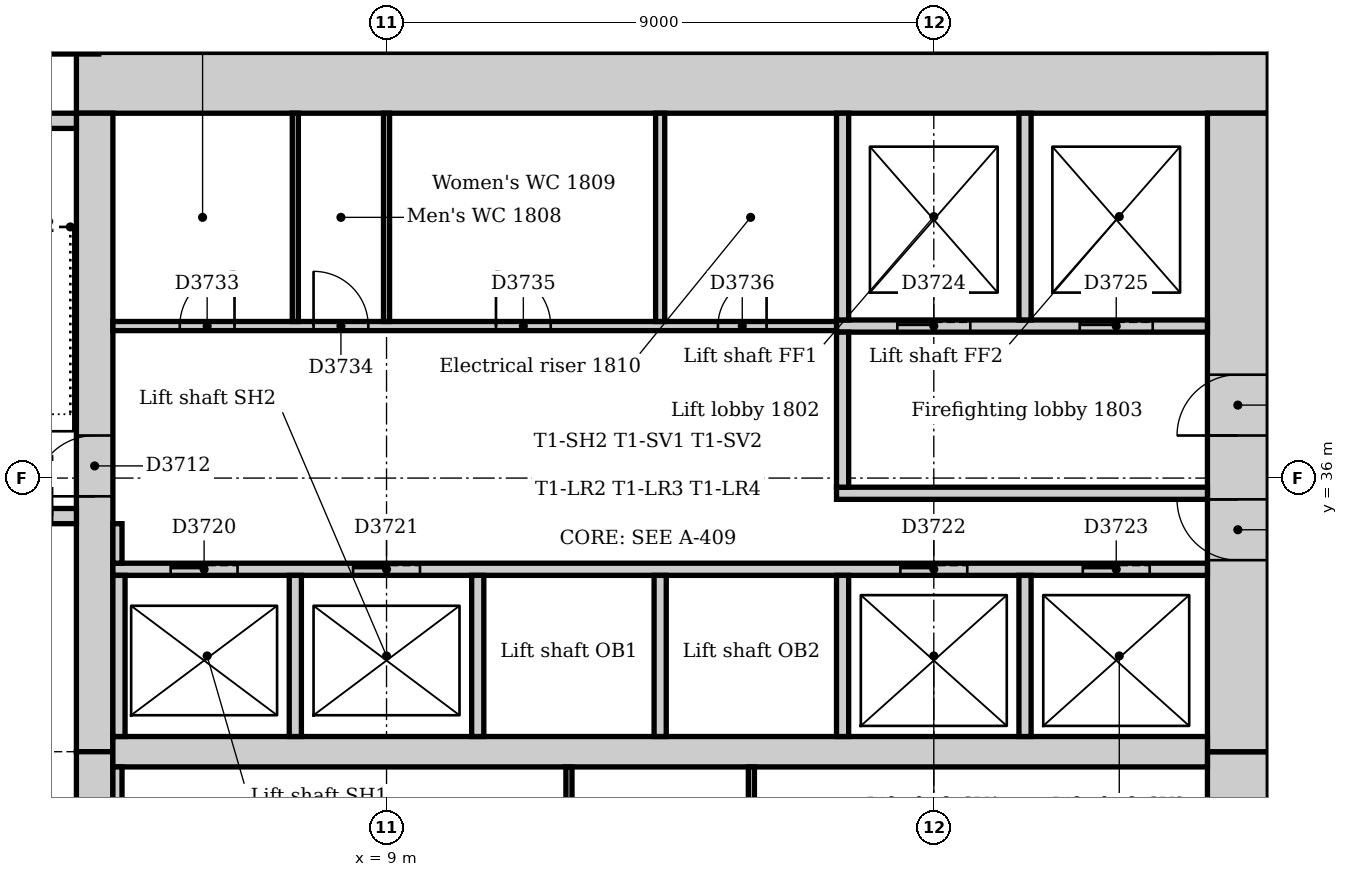
"""IFC4 building model, lengths in metres.
Left out: names, types, materials, properties, quantities, classifications, styles, units other than length and angle.
Written with IfcOpenShell. Run it as: python <this file> out.ifc"""

import sys

from ifc_helpers import new_model, si_unit, direction, frame, frame_2d, origin, origin_2d, place, context, subcontext, project, spatial, rectangle, extrude, element, fill, save


model = new_model("IFC4")
c1 = context("Model", 3, precision=1e-05, world=origin(), true_north=direction((0.0, 1.0)))
c2 = subcontext(c1, "Body", "Model", "MODEL_VIEW")
j1 = project(units=[si_unit("LENGTHUNIT", "METRE"), si_unit("PLANEANGLEUNIT", "RADIAN")], contexts=[c1])
p1 = place(None, origin())
s1 = spatial("IfcSite", under=j1, at=p1, CompositionType="ELEMENT")
p2 = place(p1, origin())
s2 = spatial("IfcBuilding", under=s1, at=p2, CompositionType="ELEMENT")
p3 = place(p2, frame((0.0, 0.0, 79.0)))
s3 = spatial("IfcBuildingStorey", under=s2, at=p3, CompositionType="ELEMENT", Elevation=79.0)
p4 = place(p3, frame((23.5, 42.5, 0.0), z_axis=(0.0, 0.0, 1.0), x_axis=(-1.0, 0.0, 0.0)))
e1 = element("IfcWall", 1, at=p4, inside=s3, PredefinedType="SOLIDWALL", context=c2, shape_type="SweptSolid", body=[
    extrude(rectangle(XDim=19.6, YDim=1.0, at=frame_2d((9.8, 0.0))), origin(), (0.0, 0.0, 1.0), 4.0),
])
p5 = place(p3, frame((23.0, 21.0, 0.0), z_axis=(0.0, 0.0, 1.0), x_axis=(0.0, 1.0, 0.0)))
e2 = element("IfcWall", 2, at=p5, inside=s3, PredefinedType="SOLIDWALL", context=c2, shape_type="SweptSolid", body=[
    extrude(rectangle(XDim=10.5, YDim=1.0, at=frame_2d((5.25, 0.0))), origin(), (0.0, 0.0, 1.0), 4.0),
])
p6 = place(p5, frame((4.35, 0.0, 0.0)))
e3 = element("IfcOpeningElement", 3, at=p6, cuts=e2, PredefinedType="OPENING", context=c2, shape_type="SweptSolid", body=[
    extrude(rectangle(XDim=1.8, YDim=2.1, at=frame_2d((0.9, 1.05))), frame((0.0, 0.51, 0.0), z_axis=(0.0, -1.0, 0.0), x_axis=(1.0, 0.0, 0.0)), (0.0, 0.0, 1.0), 1.02),
])
p7 = place(p3, frame((23.0, 31.5, 0.0), z_axis=(0.0, 0.0, 1.0), x_axis=(0.0, 1.0, 0.0)))
e4 = element("IfcWall", 4, at=p7, inside=s3, PredefinedType="SOLIDWALL", context=c2, shape_type="SweptSolid", body=[
    extrude(rectangle(XDim=10.5, YDim=1.0, at=frame_2d((5.25, 0.0))), origin(), (0.0, 0.0, 1.0), 4.0),
])
p8 = place(p7, frame((3.15, 0.0, 0.0)))
e5 = element("IfcOpeningElement", 5, at=p8, cuts=e4, PredefinedType="OPENING", context=c2, shape_type="SweptSolid", body=[
    extrude(rectangle(XDim=1.0, YDim=2.1, at=frame_2d((0.5, 1.05))), frame((0.0, 0.51, 0.0), z_axis=(0.0, -1.0, 0.0), x_axis=(1.0, 0.0, 0.0)), (0.0, 0.0, 1.0), 1.02),
])
p9 = place(p7, frame((5.2, 0.0, 0.0)))
e6 = element("IfcOpeningElement", 6, at=p9, cuts=e4, PredefinedType="OPENING", context=c2, shape_type="SweptSolid", body=[
    extrude(rectangle(XDim=1.0, YDim=2.1, at=frame_2d((0.5, 1.05))), frame((0.0, 0.51, 0.0), z_axis=(0.0, -1.0, 0.0), x_axis=(1.0, 0.0, 0.0)), (0.0, 0.0, 1.0), 1.02),
])
p10 = place(p3, frame((4.2, 42.0, 0.0), z_axis=(0.0, 0.0, 1.0), x_axis=(0.0, -1.0, 0.0)))
e7 = element("IfcWall", 7, at=p10, inside=s3, PredefinedType="SOLIDWALL", context=c2, shape_type="SweptSolid", body=[
    extrude(rectangle(XDim=10.5, YDim=0.6, at=frame_2d((5.25, 0.0))), origin(), (0.0, 0.0, 1.0), 4.0),
])
p11 = place(p10, frame((5.3, 0.0, 0.0)))
e8 = element("IfcOpeningElement", 8, at=p11, cuts=e7, PredefinedType="OPENING", context=c2, shape_type="SweptSolid", body=[
    extrude(rectangle(XDim=1.0, YDim=2.1, at=frame_2d((0.5, 1.05))), frame((0.0, 0.31, 0.0), z_axis=(0.0, -1.0, 0.0), x_axis=(1.0, 0.0, 0.0)), (0.0, 0.0, 1.0), 0.62),
])
p12 = place(p3, frame((4.2, 31.5, 0.0), z_axis=(0.0, 0.0, 1.0), x_axis=(0.0, -1.0, 0.0)))
e9 = element("IfcWall", 9, at=p12, inside=s3, PredefinedType="SOLIDWALL", context=c2, shape_type="SweptSolid", body=[
    extrude(rectangle(XDim=10.5, YDim=0.6, at=frame_2d((5.25, 0.0))), origin(), (0.0, 0.0, 1.0), 4.0),
])
p13 = place(p12, frame((4.25, 0.0, 0.0)))
e10 = element("IfcOpeningElement", 10, at=p13, cuts=e9, PredefinedType="OPENING", context=c2, shape_type="SweptSolid", body=[
    extrude(rectangle(XDim=1.0, YDim=2.1, at=frame_2d((0.5, 1.05))), frame((0.0, 0.31, 0.0), z_axis=(0.0, -1.0, 0.0), x_axis=(1.0, 0.0, 0.0)), (0.0, 0.0, 1.0), 0.62),
])
p14 = place(p3, frame((4.5, 31.5, 0.0), z_axis=(0.0, 0.0, 1.0), x_axis=(1.0, 0.0, 0.0)))
e11 = element("IfcWall", 11, at=p14, inside=s3, PredefinedType="SOLIDWALL", context=c2, shape_type="SweptSolid", body=[
    extrude(rectangle(XDim=18.0, YDim=0.5, at=frame_2d((9.0, 0.0))), origin(), (0.0, 0.0, 1.0), 4.0),
])
p15 = place(p3, frame((0.36, 35.375, 0.0), z_axis=(0.0, 0.0, 1.0), x_axis=(1.0, 0.0, 0.0)))
e12 = element("IfcWall", 12, at=p15, inside=s3, PredefinedType="SOLIDWALL", context=c2, shape_type="SweptSolid", body=[
    extrude(rectangle(XDim=3.54, YDim=0.25, at=frame_2d((1.77, 0.0))), origin(), (0.0, 0.0, 1.0), 4.0),
])
p16 = place(p15, frame((2.14, 0.0, 0.0)))
e13 = element("IfcOpeningElement", 13, at=p16, cuts=e12, PredefinedType="OPENING", context=c2, shape_type="SweptSolid", body=[
    extrude(rectangle(XDim=1.0, YDim=2.1, at=frame_2d((0.5, 1.05))), frame((0.0, 0.135, 0.0), z_axis=(0.0, -1.0, 0.0), x_axis=(1.0, 0.0, 0.0)), (0.0, 0.0, 1.0), 0.27),
])
p17 = place(p3, frame((3.9, 41.875, 0.0), z_axis=(0.0, 0.0, 1.0), x_axis=(-1.0, 0.0, 0.0)))
e14 = element("IfcWall", 14, at=p17, inside=s3, PredefinedType="SOLIDWALL", context=c2, shape_type="SweptSolid", body=[
    extrude(rectangle(XDim=3.54, YDim=0.25, at=frame_2d((1.77, 0.0))), origin(), (0.0, 0.0, 1.0), 4.0),
])
p18 = place(p3, frame((3.667, 43.574, 0.0), z_axis=(0.0, 0.0, 1.0), x_axis=(1.0, 0.0, 0.0)))
e15 = element("IfcColumn", 15, at=p18, inside=s3, PredefinedType="COLUMN", context=c2, shape_type="SweptSolid", body=[
    extrude(rectangle(XDim=1.2, YDim=1.2, at=origin_2d()), origin(), (0.0, 0.0, 1.0), 3.85),
])
p19 = place(p3, frame((16.4, 35.75, 0.0), z_axis=(0.0, 0.0, 1.0), x_axis=(1.0, 0.0, 0.0)))
e16 = element("IfcWall", 16, at=p19, inside=s3, PredefinedType="PARTITIONING", context=c2, shape_type="SweptSolid", body=[
    extrude(rectangle(XDim=6.1, YDim=0.2, at=frame_2d((3.05, 0.0))), origin(), (0.0, 0.0, 1.0), 3.85),
])
p20 = place(p3, frame((16.4, 38.5, 0.0), z_axis=(0.0, 0.0, 1.0), x_axis=(1.0, 0.0, 0.0)))
e17 = element("IfcWall", 17, at=p20, inside=s3, PredefinedType="PARTITIONING", context=c2, shape_type="SweptSolid", body=[
    extrude(rectangle(XDim=6.1, YDim=0.2, at=frame_2d((3.05, 0.0))), origin(), (0.0, 0.0, 1.0), 3.85),
])
p21 = place(p20, frame((1.0, 0.0, 0.0)))
e18 = element("IfcOpeningElement", 18, at=p21, cuts=e17, PredefinedType="OPENING", context=c2, shape_type="SweptSolid", body=[
    extrude(rectangle(XDim=1.2, YDim=2.1, at=frame_2d((0.6, 1.05))), frame((0.0, 0.11, 0.0), z_axis=(0.0, -1.0, 0.0), x_axis=(1.0, 0.0, 0.0)), (0.0, 0.0, 1.0), 0.22),
])
p22 = place(p20, frame((4.0, 0.0, 0.0)))
e19 = element("IfcOpeningElement", 19, at=p22, cuts=e17, PredefinedType="OPENING", context=c2, shape_type="SweptSolid", body=[
    extrude(rectangle(XDim=1.2, YDim=2.1, at=frame_2d((0.6, 1.05))), frame((0.0, 0.11, 0.0), z_axis=(0.0, -1.0, 0.0), x_axis=(1.0, 0.0, 0.0)), (0.0, 0.0, 1.0), 0.22),
])
p23 = place(p3, frame((16.5, 35.85, 0.0), z_axis=(0.0, 0.0, 1.0), x_axis=(0.0, 1.0, 0.0)))
e20 = element("IfcWall", 20, at=p23, inside=s3, PredefinedType="PARTITIONING", context=c2, shape_type="SweptSolid", body=[
    extrude(rectangle(XDim=2.55, YDim=0.2, at=frame_2d((1.275, 0.0))), origin(), (0.0, 0.0, 1.0), 3.85),
])
p24 = place(p3, frame((4.5, 34.5, 0.0), z_axis=(0.0, 0.0, 1.0), x_axis=(1.0, 0.0, 0.0)))
e21 = element("IfcWall", 21, at=p24, inside=s3, PredefinedType="PARTITIONING", context=c2, shape_type="SweptSolid", body=[
    extrude(rectangle(XDim=18.0, YDim=0.2, at=frame_2d((9.0, 0.0))), origin(), (0.0, 0.0, 1.0), 3.85),
])
p25 = place(p24, frame((0.95, 0.0, 0.0)))
e22 = element("IfcOpeningElement", 22, at=p25, cuts=e21, PredefinedType="OPENING", context=c2, shape_type="SweptSolid", body=[
    extrude(rectangle(XDim=1.1, YDim=2.1, at=frame_2d((0.55, 1.05))), frame((0.0, 0.11, 0.0), z_axis=(0.0, -1.0, 0.0), x_axis=(1.0, 0.0, 0.0)), (0.0, 0.0, 1.0), 0.22),
])
p26 = place(p24, frame((3.95, 0.0, 0.0)))
e23 = element("IfcOpeningElement", 23, at=p26, cuts=e21, PredefinedType="OPENING", context=c2, shape_type="SweptSolid", body=[
    extrude(rectangle(XDim=1.1, YDim=2.1, at=frame_2d((0.55, 1.05))), frame((0.0, 0.11, 0.0), z_axis=(0.0, -1.0, 0.0), x_axis=(1.0, 0.0, 0.0)), (0.0, 0.0, 1.0), 0.22),
])
p27 = place(p24, frame((12.95, 0.0, 0.0)))
e24 = element("IfcOpeningElement", 24, at=p27, cuts=e21, PredefinedType="OPENING", context=c2, shape_type="SweptSolid", body=[
    extrude(rectangle(XDim=1.1, YDim=2.1, at=frame_2d((0.55, 1.05))), frame((0.0, 0.11, 0.0), z_axis=(0.0, -1.0, 0.0), x_axis=(1.0, 0.0, 0.0)), (0.0, 0.0, 1.0), 0.22),
])
p28 = place(p24, frame((15.95, 0.0, 0.0)))
e25 = element("IfcOpeningElement", 25, at=p28, cuts=e21, PredefinedType="OPENING", context=c2, shape_type="SweptSolid", body=[
    extrude(rectangle(XDim=1.1, YDim=2.1, at=frame_2d((0.55, 1.05))), frame((0.0, 0.11, 0.0), z_axis=(0.0, -1.0, 0.0), x_axis=(1.0, 0.0, 0.0)), (0.0, 0.0, 1.0), 0.22),
])
for number, where, z_axis, x_axis in (
    (26, (16.5, 38.6, 0.0), (0.0, 0.0, 1.0), (0.0, 1.0, 0.0)),
    (27, (19.5, 38.6, 0.0), (0.0, 0.0, 1.0), (0.0, 1.0, 0.0)),
):
    element("IfcWall", number, at=place(p3, frame(where, z_axis=z_axis, x_axis=x_axis)), inside=s3, PredefinedType="PARTITIONING", context=c2, shape_type="SweptSolid", body=[
        extrude(rectangle(XDim=3.4, YDim=0.2, at=frame_2d((1.7, 0.0))), origin(), (0.0, 0.0, 1.0), 3.85),
    ])
for number, where, z_axis, x_axis in (
    (28, (4.6, 31.75, 0.0), (0.0, 0.0, 1.0), (0.0, 1.0, 0.0)),
    (29, (7.5, 31.75, 0.0), (0.0, 0.0, 1.0), (0.0, 1.0, 0.0)),
    (30, (10.5, 31.75, 0.0), (0.0, 0.0, 1.0), (0.0, 1.0, 0.0)),
    (31, (13.5, 31.75, 0.0), (0.0, 0.0, 1.0), (0.0, 1.0, 0.0)),
    (32, (16.5, 31.75, 0.0), (0.0, 0.0, 1.0), (0.0, 1.0, 0.0)),
    (33, (19.5, 31.75, 0.0), (0.0, 0.0, 1.0), (0.0, 1.0, 0.0)),
):
    element("IfcWall", number, at=place(p3, frame(where, z_axis=z_axis, x_axis=x_axis)), inside=s3, PredefinedType="PARTITIONING", context=c2, shape_type="SweptSolid", body=[
        extrude(rectangle(XDim=2.65, YDim=0.2, at=frame_2d((1.325, 0.0))), origin(), (0.0, 0.0, 1.0), 3.85),
    ])
p29 = place(p3, frame((4.5, 38.5, 0.0), z_axis=(0.0, 0.0, 1.0), x_axis=(1.0, 0.0, 0.0)))
e34 = element("IfcWall", 34, at=p29, inside=s3, PredefinedType="PARTITIONING", context=c2, shape_type="SweptSolid", body=[
    extrude(rectangle(XDim=11.9, YDim=0.15, at=frame_2d((5.95, 0.0))), origin(), (0.0, 0.0, 1.0), 3.85),
])
p30 = place(p29, frame((1.1, 0.0, 0.0)))
e35 = element("IfcOpeningElement", 35, at=p30, cuts=e34, PredefinedType="OPENING", context=c2, shape_type="SweptSolid", body=[
    extrude(rectangle(XDim=0.9, YDim=2.1, at=frame_2d((0.45, 1.05))), frame((0.0, 0.085, 0.0), z_axis=(0.0, -1.0, 0.0), x_axis=(1.0, 0.0, 0.0)), (0.0, 0.0, 1.0), 0.17),
])
p31 = place(p29, frame((3.3, 0.0, 0.0)))
e36 = element("IfcOpeningElement", 36, at=p31, cuts=e34, PredefinedType="OPENING", context=c2, shape_type="SweptSolid", body=[
    extrude(rectangle(XDim=0.9, YDim=2.1, at=frame_2d((0.45, 1.05))), frame((0.0, 0.085, 0.0), z_axis=(0.0, -1.0, 0.0), x_axis=(1.0, 0.0, 0.0)), (0.0, 0.0, 1.0), 0.17),
])
p32 = place(p29, frame((6.3, 0.0, 0.0)))
e37 = element("IfcOpeningElement", 37, at=p32, cuts=e34, PredefinedType="OPENING", context=c2, shape_type="SweptSolid", body=[
    extrude(rectangle(XDim=0.9, YDim=2.1, at=frame_2d((0.45, 1.05))), frame((0.0, 0.085, 0.0), z_axis=(0.0, -1.0, 0.0), x_axis=(1.0, 0.0, 0.0)), (0.0, 0.0, 1.0), 0.17),
])
p33 = place(p29, frame((9.95, 0.0, 0.0)))
e38 = element("IfcOpeningElement", 38, at=p33, cuts=e34, PredefinedType="OPENING", context=c2, shape_type="SweptSolid", body=[
    extrude(rectangle(XDim=0.8, YDim=2.1, at=frame_2d((0.4, 1.05))), frame((0.0, 0.085, 0.0), z_axis=(0.0, -1.0, 0.0), x_axis=(1.0, 0.0, 0.0)), (0.0, 0.0, 1.0), 0.17),
])
p34 = place(p3, frame((4.575, 28.575, 0.0), z_axis=(0.0, 0.0, 1.0), x_axis=(0.0, 1.0, 0.0)))
e39 = element("IfcWall", 39, at=p34, inside=s3, PredefinedType="PARTITIONING", context=c2, shape_type="SweptSolid", body=[
    extrude(rectangle(XDim=2.675, YDim=0.15, at=frame_2d((1.337, 0.0))), origin(), (0.0, 0.0, 1.0), 3.85),
])
p35 = place(p3, frame((4.575, 34.6, 0.0), z_axis=(0.0, 0.0, 1.0), x_axis=(0.0, 1.0, 0.0)))
e40 = element("IfcWall", 40, at=p35, inside=s3, PredefinedType="PARTITIONING", context=c2, shape_type="SweptSolid", body=[
    extrude(rectangle(XDim=0.65, YDim=0.15, at=frame_2d((0.325, 0.0))), origin(), (0.0, 0.0, 1.0), 3.85),
])
p36 = place(p3, frame((13.5, 38.575, 0.0), z_axis=(0.0, 0.0, 1.0), x_axis=(0.0, 1.0, 0.0)))
e41 = element("IfcWall", 41, at=p36, inside=s3, PredefinedType="PARTITIONING", context=c2, shape_type="SweptSolid", body=[
    extrude(rectangle(XDim=3.425, YDim=0.15, at=frame_2d((1.712, 0.0))), origin(), (0.0, 0.0, 1.0), 3.85),
])
for number, where, z_axis, x_axis in (
    (42, (7.5, 38.575, 0.0), (0.0, 0.0, 1.0), (0.0, 1.0, 0.0)),
    (43, (9.0, 38.575, 0.0), (0.0, 0.0, 1.0), (0.0, 1.0, 0.0)),
):
    element("IfcWall", number, at=place(p3, frame(where, z_axis=z_axis, x_axis=x_axis)), inside=s3, PredefinedType="PARTITIONING", context=c2, shape_type="SweptSolid", body=[
        extrude(rectangle(XDim=3.425, YDim=0.1, at=frame_2d((1.712, 0.0))), origin(), (0.0, 0.0, 1.0), 3.85),
    ])
for number, where, z_axis, x_axis in (
    (44, (12.0, 28.575, 0.0), (0.0, 0.0, 1.0), (0.0, 1.0, 0.0)),
    (45, (15.0, 28.575, 0.0), (0.0, 0.0, 1.0), (0.0, 1.0, 0.0)),
):
    element("IfcWall", number, at=place(p3, frame(where, z_axis=z_axis, x_axis=x_axis)), inside=s3, PredefinedType="PARTITIONING", context=c2, shape_type="SweptSolid", body=[
        extrude(rectangle(XDim=2.675, YDim=0.1, at=frame_2d((1.337, 0.0))), origin(), (0.0, 0.0, 1.0), 3.85),
    ])
p37 = place(p11, frame((1.0, 0.0, 0.0), z_axis=(0.0, 0.0, 1.0), x_axis=(-1.0, 0.0, 0.0)))
e46 = element("IfcDoor", 46, at=p37, inside=s3, OperationType="SINGLE_SWING_LEFT", PredefinedType="DOOR", context=c2, shape_type="SweptSolid", body=[
    extrude(rectangle(XDim=1.0, YDim=2.1, at=frame_2d((0.5, 1.05))), frame((0.0, 0.025, 0.0), z_axis=(0.0, -1.0, 0.0), x_axis=(1.0, 0.0, 0.0)), (0.0, 0.0, 1.0), 0.05),
])
fill(e8, e46)
p38 = place(p25, origin())
e47 = element("IfcDoor", 47, at=p38, inside=s3, OperationType="SLIDING_TO_LEFT", PredefinedType="DOOR", context=c2, shape_type="SweptSolid", body=[
    extrude(rectangle(XDim=1.1, YDim=2.1, at=frame_2d((0.55, 1.05))), frame((0.0, 0.025, 0.0), z_axis=(0.0, -1.0, 0.0), x_axis=(1.0, 0.0, 0.0)), (0.0, 0.0, 1.0), 0.05),
])
fill(e22, e47)
p39 = place(p26, origin())
e48 = element("IfcDoor", 48, at=p39, inside=s3, OperationType="SLIDING_TO_LEFT", PredefinedType="DOOR", context=c2, shape_type="SweptSolid", body=[
    extrude(rectangle(XDim=1.1, YDim=2.1, at=frame_2d((0.55, 1.05))), frame((0.0, 0.025, 0.0), z_axis=(0.0, -1.0, 0.0), x_axis=(1.0, 0.0, 0.0)), (0.0, 0.0, 1.0), 0.05),
])
fill(e23, e48)
p40 = place(p27, origin())
e49 = element("IfcDoor", 49, at=p40, inside=s3, OperationType="SLIDING_TO_LEFT", PredefinedType="DOOR", context=c2, shape_type="SweptSolid", body=[
    extrude(rectangle(XDim=1.1, YDim=2.1, at=frame_2d((0.55, 1.05))), frame((0.0, 0.025, 0.0), z_axis=(0.0, -1.0, 0.0), x_axis=(1.0, 0.0, 0.0)), (0.0, 0.0, 1.0), 0.05),
])
fill(e24, e49)
p41 = place(p28, origin())
e50 = element("IfcDoor", 50, at=p41, inside=s3, OperationType="SLIDING_TO_LEFT", PredefinedType="DOOR", context=c2, shape_type="SweptSolid", body=[
    extrude(rectangle(XDim=1.1, YDim=2.1, at=frame_2d((0.55, 1.05))), frame((0.0, 0.025, 0.0), z_axis=(0.0, -1.0, 0.0), x_axis=(1.0, 0.0, 0.0)), (0.0, 0.0, 1.0), 0.05),
])
fill(e25, e50)
p42 = place(p21, origin())
e51 = element("IfcDoor", 51, at=p42, inside=s3, OperationType="SLIDING_TO_LEFT", PredefinedType="DOOR", context=c2, shape_type="SweptSolid", body=[
    extrude(rectangle(XDim=1.2, YDim=2.1, at=frame_2d((0.6, 1.05))), frame((0.0, 0.025, 0.0), z_axis=(0.0, -1.0, 0.0), x_axis=(1.0, 0.0, 0.0)), (0.0, 0.0, 1.0), 0.05),
])
fill(e18, e51)
p43 = place(p22, origin())
e52 = element("IfcDoor", 52, at=p43, inside=s3, OperationType="SLIDING_TO_LEFT", PredefinedType="DOOR", context=c2, shape_type="SweptSolid", body=[
    extrude(rectangle(XDim=1.2, YDim=2.1, at=frame_2d((0.6, 1.05))), frame((0.0, 0.025, 0.0), z_axis=(0.0, -1.0, 0.0), x_axis=(1.0, 0.0, 0.0)), (0.0, 0.0, 1.0), 0.05),
])
fill(e19, e52)
p44 = place(p8, origin())
e53 = element("IfcDoor", 53, at=p44, inside=s3, OperationType="SINGLE_SWING_RIGHT", PredefinedType="DOOR", context=c2, shape_type="SweptSolid", body=[
    extrude(rectangle(XDim=1.0, YDim=2.1, at=frame_2d((0.5, 1.05))), frame((0.0, 0.025, 0.0), z_axis=(0.0, -1.0, 0.0), x_axis=(1.0, 0.0, 0.0)), (0.0, 0.0, 1.0), 0.05),
])
fill(e5, e53)
p45 = place(p9, origin())
e54 = element("IfcDoor", 54, at=p45, inside=s3, OperationType="SINGLE_SWING_LEFT", PredefinedType="DOOR", context=c2, shape_type="SweptSolid", body=[
    extrude(rectangle(XDim=1.0, YDim=2.1, at=frame_2d((0.5, 1.05))), frame((0.0, 0.025, 0.0), z_axis=(0.0, -1.0, 0.0), x_axis=(1.0, 0.0, 0.0)), (0.0, 0.0, 1.0), 0.05),
])
fill(e6, e54)
p46 = place(p30, origin())
e55 = element("IfcDoor", 55, at=p46, inside=s3, OperationType="SINGLE_SWING_RIGHT", PredefinedType="DOOR", context=c2, shape_type="SweptSolid", body=[
    extrude(rectangle(XDim=0.9, YDim=2.1, at=frame_2d((0.45, 1.05))), frame((0.0, 0.025, 0.0), z_axis=(0.0, -1.0, 0.0), x_axis=(1.0, 0.0, 0.0)), (0.0, 0.0, 1.0), 0.05),
])
fill(e35, e55)
p47 = place(p31, origin())
e56 = element("IfcDoor", 56, at=p47, inside=s3, OperationType="SINGLE_SWING_LEFT", PredefinedType="DOOR", context=c2, shape_type="SweptSolid", body=[
    extrude(rectangle(XDim=0.9, YDim=2.1, at=frame_2d((0.45, 1.05))), frame((0.0, 0.025, 0.0), z_axis=(0.0, -1.0, 0.0), x_axis=(1.0, 0.0, 0.0)), (0.0, 0.0, 1.0), 0.05),
])
fill(e36, e56)
p48 = place(p32, origin())
e57 = element("IfcDoor", 57, at=p48, inside=s3, OperationType="SINGLE_SWING_LEFT", PredefinedType="DOOR", context=c2, shape_type="SweptSolid", body=[
    extrude(rectangle(XDim=0.9, YDim=2.1, at=frame_2d((0.45, 1.05))), frame((0.0, 0.025, 0.0), z_axis=(0.0, -1.0, 0.0), x_axis=(1.0, 0.0, 0.0)), (0.0, 0.0, 1.0), 0.05),
])
fill(e37, e57)
p49 = place(p33, origin())
e58 = element("IfcDoor", 58, at=p49, inside=s3, OperationType="SINGLE_SWING_RIGHT", PredefinedType="DOOR", context=c2, shape_type="SweptSolid", body=[
    extrude(rectangle(XDim=0.8, YDim=2.1, at=frame_2d((0.4, 1.05))), frame((0.0, 0.025, 0.0), z_axis=(0.0, -1.0, 0.0), x_axis=(1.0, 0.0, 0.0)), (0.0, 0.0, 1.0), 0.05),
])
fill(e38, e58)
save(model, sys.argv[1])
